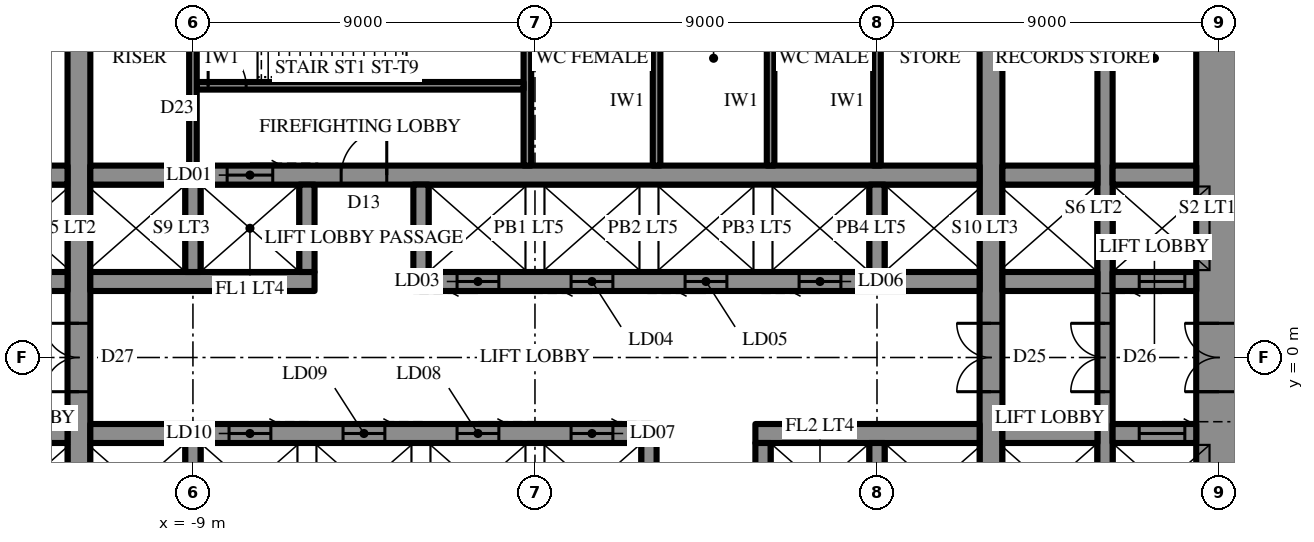
"""IFC4 building model, lengths in metres.
Left out: names, types, materials, properties, quantities, classifications, styles, units other than length and angle.
Written with IfcOpenShell. Run it as: python <this file> out.ifc"""

import sys

from ifc_helpers import new_model, si_unit, direction, frame, frame_2d, origin, place, context, subcontext, project, spatial, rectangle, extrude, element, fill, save


model = new_model("IFC4")
c1 = context("Model", 3, precision=1e-05, world=origin(), true_north=direction((0.0, 1.0)))
c2 = subcontext(c1, "Body", "Model", "MODEL_VIEW")
j1 = project(units=[si_unit("LENGTHUNIT", "METRE"), si_unit("PLANEANGLEUNIT", "RADIAN")], contexts=[c1])
p1 = place(None, origin())
s1 = spatial("IfcSite", under=j1, at=p1, CompositionType="ELEMENT")
p2 = place(p1, origin())
s2 = spatial("IfcBuilding", under=s1, at=p2, CompositionType="ELEMENT")
p3 = place(p2, frame((0.0, 0.0, 114.5)))
s3 = spatial("IfcBuildingStorey", under=s2, at=p3, CompositionType="ELEMENT", Elevation=114.5)
p4 = place(p3, frame((18.0, -10.7, 0.0), z_axis=(0.0, 0.0, 1.0), x_axis=(0.0, 1.0, 0.0)))
e1 = element("IfcWall", 1, at=p4, inside=s3, PredefinedType="SHEAR", context=c2, shape_type="SweptSolid", body=[
    extrude(rectangle(XDim=21.4, YDim=1.2, at=frame_2d((10.7, 0.0))), origin(), (0.0, 0.0, 1.0), 5.0),
])
p5 = place(p4, frame((9.8, 0.0, 0.0)))
e2 = element("IfcOpeningElement", 2, at=p5, cuts=e1, PredefinedType="OPENING", context=c2, shape_type="SweptSolid", body=[
    extrude(rectangle(XDim=1.8, YDim=2.4, at=frame_2d((0.9, 1.2))), frame((0.0, 0.61, 0.0), z_axis=(0.0, -1.0, 0.0), x_axis=(1.0, 0.0, 0.0)), (0.0, 0.0, 1.0), 1.22),
])
p6 = place(p3, frame((12.0, -10.7, 0.0), z_axis=(0.0, 0.0, 1.0), x_axis=(0.0, 1.0, 0.0)))
e3 = element("IfcWall", 3, at=p6, inside=s3, PredefinedType="SHEAR", context=c2, shape_type="SweptSolid", body=[
    extrude(rectangle(XDim=21.4, YDim=0.6, at=frame_2d((10.7, 0.0))), origin(), (0.0, 0.0, 1.0), 5.0),
])
p7 = place(p6, frame((9.8, 0.0, 0.0)))
e4 = element("IfcOpeningElement", 4, at=p7, cuts=e3, PredefinedType="OPENING", context=c2, shape_type="SweptSolid", body=[
    extrude(rectangle(XDim=1.8, YDim=2.4, at=frame_2d((0.9, 1.2))), frame((0.0, 0.31, 0.0), z_axis=(0.0, -1.0, 0.0), x_axis=(1.0, 0.0, 0.0)), (0.0, 0.0, 1.0), 0.62),
])
p8 = place(p3, frame((-12.0, -10.7, 0.0), z_axis=(0.0, 0.0, 1.0), x_axis=(0.0, 1.0, 0.0)))
e5 = element("IfcWall", 5, at=p8, inside=s3, PredefinedType="SHEAR", context=c2, shape_type="SweptSolid", body=[
    extrude(rectangle(XDim=21.4, YDim=0.6, at=frame_2d((10.7, 0.0))), origin(), (0.0, 0.0, 1.0), 5.0),
])
p9 = place(p8, frame((9.8, 0.0, 0.0)))
e6 = element("IfcOpeningElement", 6, at=p9, cuts=e5, PredefinedType="OPENING", context=c2, shape_type="SweptSolid", body=[
    extrude(rectangle(XDim=1.8, YDim=2.4, at=frame_2d((0.9, 1.2))), frame((0.0, 0.31, 0.0), z_axis=(0.0, -1.0, 0.0), x_axis=(1.0, 0.0, 0.0)), (0.0, 0.0, 1.0), 0.62),
])
p10 = place(p3, frame((15.0, -10.7, 0.0), z_axis=(0.0, 0.0, 1.0), x_axis=(0.0, 1.0, 0.0)))
e7 = element("IfcWall", 7, at=p10, inside=s3, PredefinedType="SHEAR", context=c2, shape_type="SweptSolid", body=[
    extrude(rectangle(XDim=21.4, YDim=0.4, at=frame_2d((10.7, 0.0))), origin(), (0.0, 0.0, 1.0), 5.0),
])
p11 = place(p10, frame((9.8, 0.0, 0.0)))
e8 = element("IfcOpeningElement", 8, at=p11, cuts=e7, PredefinedType="OPENING", context=c2, shape_type="SweptSolid", body=[
    extrude(rectangle(XDim=1.8, YDim=2.4, at=frame_2d((0.9, 1.2))), frame((0.0, 0.21, 0.0), z_axis=(0.0, -1.0, 0.0), x_axis=(1.0, 0.0, 0.0)), (0.0, 0.0, 1.0), 0.42),
])
p12 = place(p3, frame((-14.8, 2.0, 0.0), z_axis=(0.0, 0.0, 1.0), x_axis=(1.0, 0.0, 0.0)))
e9 = element("IfcWall", 9, at=p12, inside=s3, PredefinedType="SHEAR", context=c2, shape_type="SweptSolid", body=[
    extrude(rectangle(XDim=2.5, YDim=0.5, at=frame_2d((1.25, 0.0))), origin(), (0.0, 0.0, 1.0), 5.0),
])
p13 = place(p3, frame((-11.7, 2.0, 0.0), z_axis=(0.0, 0.0, 1.0), x_axis=(1.0, 0.0, 0.0)))
e10 = element("IfcWall", 10, at=p13, inside=s3, PredefinedType="SHEAR", context=c2, shape_type="SweptSolid", body=[
    extrude(rectangle(XDim=5.9, YDim=0.5, at=frame_2d((2.95, 0.0))), origin(), (0.0, 0.0, 1.0), 5.0),
])
p14 = place(p3, frame((-3.2, 2.0, 0.0), z_axis=(0.0, 0.0, 1.0), x_axis=(1.0, 0.0, 0.0)))
e11 = element("IfcWall", 11, at=p14, inside=s3, PredefinedType="SHEAR", context=c2, shape_type="SweptSolid", body=[
    extrude(rectangle(XDim=14.9, YDim=0.5, at=frame_2d((7.45, 0.0))), origin(), (0.0, 0.0, 1.0), 5.0),
])
p15 = place(p14, frame((1.15, 0.0, 0.0)))
e12 = element("IfcOpeningElement", 12, at=p15, cuts=e11, PredefinedType="OPENING", context=c2, shape_type="SweptSolid", body=[
    extrude(rectangle(XDim=1.1, YDim=2.2, at=frame_2d((0.55, 1.1))), frame((0.0, 0.26, 0.0), z_axis=(0.0, -1.0, 0.0), x_axis=(1.0, 0.0, 0.0)), (0.0, 0.0, 1.0), 0.52),
])
p16 = place(p14, frame((4.15, 0.0, 0.0)))
e13 = element("IfcOpeningElement", 13, at=p16, cuts=e11, PredefinedType="OPENING", context=c2, shape_type="SweptSolid", body=[
    extrude(rectangle(XDim=1.1, YDim=2.2, at=frame_2d((0.55, 1.1))), frame((0.0, 0.26, 0.0), z_axis=(0.0, -1.0, 0.0), x_axis=(1.0, 0.0, 0.0)), (0.0, 0.0, 1.0), 0.52),
])
p17 = place(p14, frame((7.15, 0.0, 0.0)))
e14 = element("IfcOpeningElement", 14, at=p17, cuts=e11, PredefinedType="OPENING", context=c2, shape_type="SweptSolid", body=[
    extrude(rectangle(XDim=1.1, YDim=2.2, at=frame_2d((0.55, 1.1))), frame((0.0, 0.26, 0.0), z_axis=(0.0, -1.0, 0.0), x_axis=(1.0, 0.0, 0.0)), (0.0, 0.0, 1.0), 0.52),
])
p18 = place(p14, frame((10.15, 0.0, 0.0)))
e15 = element("IfcOpeningElement", 15, at=p18, cuts=e11, PredefinedType="OPENING", context=c2, shape_type="SweptSolid", body=[
    extrude(rectangle(XDim=1.1, YDim=2.2, at=frame_2d((0.55, 1.1))), frame((0.0, 0.26, 0.0), z_axis=(0.0, -1.0, 0.0), x_axis=(1.0, 0.0, 0.0)), (0.0, 0.0, 1.0), 0.52),
])
p19 = place(p3, frame((12.3, 2.0, 0.0), z_axis=(0.0, 0.0, 1.0), x_axis=(1.0, 0.0, 0.0)))
e16 = element("IfcWall", 16, at=p19, inside=s3, PredefinedType="SHEAR", context=c2, shape_type="SweptSolid", body=[
    extrude(rectangle(XDim=2.5, YDim=0.5, at=frame_2d((1.25, 0.0))), origin(), (0.0, 0.0, 1.0), 5.0),
])
p20 = place(p3, frame((15.2, 2.0, 0.0), z_axis=(0.0, 0.0, 1.0), x_axis=(1.0, 0.0, 0.0)))
e17 = element("IfcWall", 17, at=p20, inside=s3, PredefinedType="SHEAR", context=c2, shape_type="SweptSolid", body=[
    extrude(rectangle(XDim=2.2, YDim=0.5, at=frame_2d((1.1, 0.0))), origin(), (0.0, 0.0, 1.0), 5.0),
])
p21 = place(p20, frame((0.7, 0.0, 0.0)))
e18 = element("IfcOpeningElement", 18, at=p21, cuts=e17, PredefinedType="OPENING", context=c2, shape_type="SweptSolid", body=[
    extrude(rectangle(XDim=1.2, YDim=2.2, at=frame_2d((0.6, 1.1))), frame((0.0, 0.26, 0.0), z_axis=(0.0, -1.0, 0.0), x_axis=(1.0, 0.0, 0.0)), (0.0, 0.0, 1.0), 0.52),
])
p22 = place(p3, frame((-14.8, 4.8, 0.0), z_axis=(0.0, 0.0, 1.0), x_axis=(1.0, 0.0, 0.0)))
e19 = element("IfcWall", 19, at=p22, inside=s3, PredefinedType="SHEAR", context=c2, shape_type="SweptSolid", body=[
    extrude(rectangle(XDim=2.5, YDim=0.5, at=frame_2d((1.25, 0.0))), origin(), (0.0, 0.0, 1.0), 5.0),
])
p23 = place(p3, frame((-11.7, 4.8, 0.0), z_axis=(0.0, 0.0, 1.0), x_axis=(1.0, 0.0, 0.0)))
e20 = element("IfcWall", 20, at=p23, inside=s3, PredefinedType="SHEAR", context=c2, shape_type="SweptSolid", body=[
    extrude(rectangle(XDim=23.4, YDim=0.5, at=frame_2d((11.7, 0.0))), origin(), (0.0, 0.0, 1.0), 5.0),
])
p24 = place(p23, frame((6.6, 0.0, 0.0)))
e21 = element("IfcOpeningElement", 21, at=p24, cuts=e20, PredefinedType="OPENING", context=c2, shape_type="SweptSolid", body=[
    extrude(rectangle(XDim=1.2, YDim=2.2, at=frame_2d((0.6, 1.1))), frame((0.0, 0.26, 0.0), z_axis=(0.0, -1.0, 0.0), x_axis=(1.0, 0.0, 0.0)), (0.0, 0.0, 1.0), 0.52),
])
p25 = place(p23, frame((3.6, 0.0, 0.0)))
e22 = element("IfcOpeningElement", 22, at=p25, cuts=e20, PredefinedType="OPENING", context=c2, shape_type="SweptSolid", body=[
    extrude(rectangle(XDim=1.2, YDim=2.2, at=frame_2d((0.6, 1.1))), frame((0.0, 0.26, 0.0), z_axis=(0.0, -1.0, 0.0), x_axis=(1.0, 0.0, 0.0)), (0.0, 0.0, 1.0), 0.52),
])
p26 = place(p3, frame((12.3, 4.8, 0.0), z_axis=(0.0, 0.0, 1.0), x_axis=(1.0, 0.0, 0.0)))
e23 = element("IfcWall", 23, at=p26, inside=s3, PredefinedType="SHEAR", context=c2, shape_type="SweptSolid", body=[
    extrude(rectangle(XDim=2.5, YDim=0.5, at=frame_2d((1.25, 0.0))), origin(), (0.0, 0.0, 1.0), 5.0),
])
p27 = place(p3, frame((15.2, 4.8, 0.0), z_axis=(0.0, 0.0, 1.0), x_axis=(1.0, 0.0, 0.0)))
e24 = element("IfcWall", 24, at=p27, inside=s3, PredefinedType="SHEAR", context=c2, shape_type="SweptSolid", body=[
    extrude(rectangle(XDim=2.2, YDim=0.5, at=frame_2d((1.1, 0.0))), origin(), (0.0, 0.0, 1.0), 5.0),
])
for number, where, z_axis, x_axis in (
    (25, (-9.0, 2.25, 0.0), (0.0, 0.0, 1.0), (0.0, 1.0, 0.0)),
    (26, (-6.0, 2.25, 0.0), (0.0, 0.0, 1.0), (0.0, 1.0, 0.0)),
    (27, (-3.0, 2.25, 0.0), (0.0, 0.0, 1.0), (0.0, 1.0, 0.0)),
    (28, (9.0, 2.25, 0.0), (0.0, 0.0, 1.0), (0.0, 1.0, 0.0)),
):
    element("IfcWall", number, at=place(p3, frame(where, z_axis=z_axis, x_axis=x_axis)), inside=s3, PredefinedType="SHEAR", context=c2, shape_type="SweptSolid", body=[
        extrude(rectangle(XDim=2.3, YDim=0.4, at=frame_2d((1.15, 0.0))), origin(), (0.0, 0.0, 1.0), 5.0),
    ])
p28 = place(p3, frame((-0.2, 5.05, 0.0), z_axis=(0.0, 0.0, 1.0), x_axis=(0.0, 1.0, 0.0)))
e29 = element("IfcWall", 29, at=p28, inside=s3, PredefinedType="SHEAR", context=c2, shape_type="SweptSolid", body=[
    extrude(rectangle(XDim=5.65, YDim=0.2, at=frame_2d((2.825, 0.0))), origin(), (0.0, 0.0, 1.0), 5.0),
])
p29 = place(p3, frame((-8.9, 7.15, 0.0), z_axis=(0.0, 0.0, 1.0), x_axis=(1.0, 0.0, 0.0)))
e30 = element("IfcWall", 30, at=p29, inside=s3, PredefinedType="SHEAR", context=c2, shape_type="SweptSolid", body=[
    extrude(rectangle(XDim=8.6, YDim=0.2, at=frame_2d((4.3, 0.0))), origin(), (0.0, 0.0, 1.0), 5.0),
])
p30 = place(p29, frame((0.3, 0.0, 0.0)))
e31 = element("IfcOpeningElement", 31, at=p30, cuts=e30, PredefinedType="OPENING", context=c2, shape_type="SweptSolid", body=[
    extrude(rectangle(XDim=1.0, YDim=2.2, at=frame_2d((0.5, 1.1))), frame((0.0, 0.11, 0.0), z_axis=(0.0, -1.0, 0.0), x_axis=(1.0, 0.0, 0.0)), (0.0, 0.0, 1.0), 0.22),
])
p31 = place(p3, frame((17.4, -2.0, 0.0), z_axis=(0.0, 0.0, 1.0), x_axis=(-1.0, 0.0, 0.0)))
e32 = element("IfcWall", 32, at=p31, inside=s3, PredefinedType="SHEAR", context=c2, shape_type="SweptSolid", body=[
    extrude(rectangle(XDim=2.2, YDim=0.5, at=frame_2d((1.1, 0.0))), origin(), (0.0, 0.0, 1.0), 5.0),
])
p32 = place(p31, frame((0.3, 0.0, 0.0)))
e33 = element("IfcOpeningElement", 33, at=p32, cuts=e32, PredefinedType="OPENING", context=c2, shape_type="SweptSolid", body=[
    extrude(rectangle(XDim=1.2, YDim=2.2, at=frame_2d((0.6, 1.1))), frame((0.0, 0.26, 0.0), z_axis=(0.0, -1.0, 0.0), x_axis=(1.0, 0.0, 0.0)), (0.0, 0.0, 1.0), 0.52),
])
p33 = place(p3, frame((14.8, -2.0, 0.0), z_axis=(0.0, 0.0, 1.0), x_axis=(-1.0, 0.0, 0.0)))
e34 = element("IfcWall", 34, at=p33, inside=s3, PredefinedType="SHEAR", context=c2, shape_type="SweptSolid", body=[
    extrude(rectangle(XDim=2.5, YDim=0.5, at=frame_2d((1.25, 0.0))), origin(), (0.0, 0.0, 1.0), 5.0),
])
p34 = place(p3, frame((11.7, -2.0, 0.0), z_axis=(0.0, 0.0, 1.0), x_axis=(-1.0, 0.0, 0.0)))
e35 = element("IfcWall", 35, at=p34, inside=s3, PredefinedType="SHEAR", context=c2, shape_type="SweptSolid", body=[
    extrude(rectangle(XDim=5.9, YDim=0.5, at=frame_2d((2.95, 0.0))), origin(), (0.0, 0.0, 1.0), 5.0),
])
p35 = place(p3, frame((3.2, -2.0, 0.0), z_axis=(0.0, 0.0, 1.0), x_axis=(-1.0, 0.0, 0.0)))
e36 = element("IfcWall", 36, at=p35, inside=s3, PredefinedType="SHEAR", context=c2, shape_type="SweptSolid", body=[
    extrude(rectangle(XDim=14.9, YDim=0.5, at=frame_2d((7.45, 0.0))), origin(), (0.0, 0.0, 1.0), 5.0),
])
p36 = place(p35, frame((1.15, 0.0, 0.0)))
e37 = element("IfcOpeningElement", 37, at=p36, cuts=e36, PredefinedType="OPENING", context=c2, shape_type="SweptSolid", body=[
    extrude(rectangle(XDim=1.1, YDim=2.2, at=frame_2d((0.55, 1.1))), frame((0.0, 0.26, 0.0), z_axis=(0.0, -1.0, 0.0), x_axis=(1.0, 0.0, 0.0)), (0.0, 0.0, 1.0), 0.52),
])
p37 = place(p35, frame((4.15, 0.0, 0.0)))
e38 = element("IfcOpeningElement", 38, at=p37, cuts=e36, PredefinedType="OPENING", context=c2, shape_type="SweptSolid", body=[
    extrude(rectangle(XDim=1.1, YDim=2.2, at=frame_2d((0.55, 1.1))), frame((0.0, 0.26, 0.0), z_axis=(0.0, -1.0, 0.0), x_axis=(1.0, 0.0, 0.0)), (0.0, 0.0, 1.0), 0.52),
])
p38 = place(p35, frame((7.15, 0.0, 0.0)))
e39 = element("IfcOpeningElement", 39, at=p38, cuts=e36, PredefinedType="OPENING", context=c2, shape_type="SweptSolid", body=[
    extrude(rectangle(XDim=1.1, YDim=2.2, at=frame_2d((0.55, 1.1))), frame((0.0, 0.26, 0.0), z_axis=(0.0, -1.0, 0.0), x_axis=(1.0, 0.0, 0.0)), (0.0, 0.0, 1.0), 0.52),
])
p39 = place(p35, frame((10.15, 0.0, 0.0)))
e40 = element("IfcOpeningElement", 40, at=p39, cuts=e36, PredefinedType="OPENING", context=c2, shape_type="SweptSolid", body=[
    extrude(rectangle(XDim=1.1, YDim=2.2, at=frame_2d((0.55, 1.1))), frame((0.0, 0.26, 0.0), z_axis=(0.0, -1.0, 0.0), x_axis=(1.0, 0.0, 0.0)), (0.0, 0.0, 1.0), 0.52),
])
p40 = place(p3, frame((-12.3, -2.0, 0.0), z_axis=(0.0, 0.0, 1.0), x_axis=(-1.0, 0.0, 0.0)))
e41 = element("IfcWall", 41, at=p40, inside=s3, PredefinedType="SHEAR", context=c2, shape_type="SweptSolid", body=[
    extrude(rectangle(XDim=2.5, YDim=0.5, at=frame_2d((1.25, 0.0))), origin(), (0.0, 0.0, 1.0), 5.0),
])
for number, where, z_axis, x_axis in (
    (42, (9.0, -2.25, 0.0), (0.0, 0.0, 1.0), (0.0, -1.0, 0.0)),
    (43, (6.0, -2.25, 0.0), (0.0, 0.0, 1.0), (0.0, -1.0, 0.0)),
    (44, (3.0, -2.25, 0.0), (0.0, 0.0, 1.0), (0.0, -1.0, 0.0)),
    (45, (-9.0, -2.25, 0.0), (0.0, 0.0, 1.0), (0.0, -1.0, 0.0)),
):
    element("IfcWall", number, at=place(p3, frame(where, z_axis=z_axis, x_axis=x_axis)), inside=s3, PredefinedType="SHEAR", context=c2, shape_type="SweptSolid", body=[
        extrude(rectangle(XDim=2.3, YDim=0.4, at=frame_2d((1.15, 0.0))), origin(), (0.0, 0.0, 1.0), 5.0),
    ])
for number, where, z_axis, x_axis in (
    (46, (-9.0, 5.05, 0.0), (0.0, 0.0, 1.0), (0.0, 1.0, 0.0)),
    (47, (9.0, 5.05, 0.0), (0.0, 0.0, 1.0), (0.0, 1.0, 0.0)),
    (48, (3.2, 5.05, 0.0), (0.0, 0.0, 1.0), (0.0, 1.0, 0.0)),
    (49, (6.2, 5.05, 0.0), (0.0, 0.0, 1.0), (0.0, 1.0, 0.0)),
):
    element("IfcWall", number, at=place(p3, frame(where, z_axis=z_axis, x_axis=x_axis)), inside=s3, PredefinedType="PARTITIONING", context=c2, shape_type="SweptSolid", body=[
        extrude(rectangle(XDim=5.65, YDim=0.2, at=frame_2d((2.825, 0.0))), origin(), (0.0, 0.0, 1.0), 4.8),
    ])
p41 = place(p5, origin())
e50 = element("IfcDoor", 50, at=p41, inside=s3, OperationType="DOUBLE_DOOR_SINGLE_SWING", PredefinedType="DOOR", context=c2, shape_type="SweptSolid", body=[
    extrude(rectangle(XDim=1.8, YDim=2.4, at=frame_2d((0.9, 1.2))), frame((0.0, 0.025, 0.0), z_axis=(0.0, -1.0, 0.0), x_axis=(1.0, 0.0, 0.0)), (0.0, 0.0, 1.0), 0.05),
])
fill(e2, e50)
p42 = place(p24, origin())
e51 = element("IfcDoor", 51, at=p42, inside=s3, OperationType="SINGLE_SWING_LEFT", PredefinedType="DOOR", context=c2, shape_type="SweptSolid", body=[
    extrude(rectangle(XDim=1.2, YDim=2.2, at=frame_2d((0.6, 1.1))), frame((0.0, 0.025, 0.0), z_axis=(0.0, -1.0, 0.0), x_axis=(1.0, 0.0, 0.0)), (0.0, 0.0, 1.0), 0.05),
])
fill(e21, e51)
p43 = place(p30, origin())
e52 = element("IfcDoor", 52, at=p43, inside=s3, OperationType="SINGLE_SWING_RIGHT", PredefinedType="DOOR", context=c2, shape_type="SweptSolid", body=[
    extrude(rectangle(XDim=1.0, YDim=2.2, at=frame_2d((0.5, 1.1))), frame((0.0, 0.025, 0.0), z_axis=(0.0, -1.0, 0.0), x_axis=(1.0, 0.0, 0.0)), (0.0, 0.0, 1.0), 0.05),
])
fill(e31, e52)
p44 = place(p7, origin())
e53 = element("IfcDoor", 53, at=p44, inside=s3, OperationType="DOUBLE_DOOR_SINGLE_SWING", PredefinedType="DOOR", context=c2, shape_type="SweptSolid", body=[
    extrude(rectangle(XDim=1.8, YDim=2.4, at=frame_2d((0.9, 1.2))), frame((0.0, 0.025, 0.0), z_axis=(0.0, -1.0, 0.0), x_axis=(1.0, 0.0, 0.0)), (0.0, 0.0, 1.0), 0.05),
])
fill(e4, e53)
p45 = place(p9, origin())
e54 = element("IfcDoor", 54, at=p45, inside=s3, OperationType="DOUBLE_DOOR_SINGLE_SWING", PredefinedType="DOOR", context=c2, shape_type="SweptSolid", body=[
    extrude(rectangle(XDim=1.8, YDim=2.4, at=frame_2d((0.9, 1.2))), frame((0.0, 0.025, 0.0), z_axis=(0.0, -1.0, 0.0), x_axis=(1.0, 0.0, 0.0)), (0.0, 0.0, 1.0), 0.05),
])
fill(e6, e54)
p46 = place(p11, origin())
e55 = element("IfcDoor", 55, at=p46, inside=s3, OperationType="DOUBLE_DOOR_SINGLE_SWING", PredefinedType="DOOR", context=c2, shape_type="SweptSolid", body=[
    extrude(rectangle(XDim=1.8, YDim=2.4, at=frame_2d((0.9, 1.2))), frame((0.0, 0.025, 0.0), z_axis=(0.0, -1.0, 0.0), x_axis=(1.0, 0.0, 0.0)), (0.0, 0.0, 1.0), 0.05),
])
fill(e8, e55)
p47 = place(p25, origin())
e56 = element("IfcDoor", 56, at=p47, inside=s3, OperationType="SLIDING_TO_LEFT", PredefinedType="DOOR", context=c2, shape_type="SweptSolid", body=[
    extrude(rectangle(XDim=1.2, YDim=2.2, at=frame_2d((0.6, 1.1))), frame((0.0, 0.025, 0.0), z_axis=(0.0, -1.0, 0.0), x_axis=(1.0, 0.0, 0.0)), (0.0, 0.0, 1.0), 0.05),
])
fill(e22, e56)
p48 = place(p15, frame((1.1, 0.0, 0.0), z_axis=(0.0, 0.0, 1.0), x_axis=(-1.0, 0.0, 0.0)))
e57 = element("IfcDoor", 57, at=p48, inside=s3, OperationType="SLIDING_TO_LEFT", PredefinedType="DOOR", context=c2, shape_type="SweptSolid", body=[
    extrude(rectangle(XDim=1.1, YDim=2.2, at=frame_2d((0.55, 1.1))), frame((0.0, 0.025, 0.0), z_axis=(0.0, -1.0, 0.0), x_axis=(1.0, 0.0, 0.0)), (0.0, 0.0, 1.0), 0.05),
])
fill(e12, e57)
p49 = place(p16, frame((1.1, 0.0, 0.0), z_axis=(0.0, 0.0, 1.0), x_axis=(-1.0, 0.0, 0.0)))
e58 = element("IfcDoor", 58, at=p49, inside=s3, OperationType="SLIDING_TO_LEFT", PredefinedType="DOOR", context=c2, shape_type="SweptSolid", body=[
    extrude(rectangle(XDim=1.1, YDim=2.2, at=frame_2d((0.55, 1.1))), frame((0.0, 0.025, 0.0), z_axis=(0.0, -1.0, 0.0), x_axis=(1.0, 0.0, 0.0)), (0.0, 0.0, 1.0), 0.05),
])
fill(e13, e58)
p50 = place(p17, frame((1.1, 0.0, 0.0), z_axis=(0.0, 0.0, 1.0), x_axis=(-1.0, 0.0, 0.0)))
e59 = element("IfcDoor", 59, at=p50, inside=s3, OperationType="SLIDING_TO_LEFT", PredefinedType="DOOR", context=c2, shape_type="SweptSolid", body=[
    extrude(rectangle(XDim=1.1, YDim=2.2, at=frame_2d((0.55, 1.1))), frame((0.0, 0.025, 0.0), z_axis=(0.0, -1.0, 0.0), x_axis=(1.0, 0.0, 0.0)), (0.0, 0.0, 1.0), 0.05),
])
fill(e14, e59)
p51 = place(p18, frame((1.1, 0.0, 0.0), z_axis=(0.0, 0.0, 1.0), x_axis=(-1.0, 0.0, 0.0)))
e60 = element("IfcDoor", 60, at=p51, inside=s3, OperationType="SLIDING_TO_LEFT", PredefinedType="DOOR", context=c2, shape_type="SweptSolid", body=[
    extrude(rectangle(XDim=1.1, YDim=2.2, at=frame_2d((0.55, 1.1))), frame((0.0, 0.025, 0.0), z_axis=(0.0, -1.0, 0.0), x_axis=(1.0, 0.0, 0.0)), (0.0, 0.0, 1.0), 0.05),
])
fill(e15, e60)
p52 = place(p21, frame((1.2, 0.0, 0.0), z_axis=(0.0, 0.0, 1.0), x_axis=(-1.0, 0.0, 0.0)))
e61 = element("IfcDoor", 61, at=p52, inside=s3, OperationType="SLIDING_TO_LEFT", PredefinedType="DOOR", context=c2, shape_type="SweptSolid", body=[
    extrude(rectangle(XDim=1.2, YDim=2.2, at=frame_2d((0.6, 1.1))), frame((0.0, 0.025, 0.0), z_axis=(0.0, -1.0, 0.0), x_axis=(1.0, 0.0, 0.0)), (0.0, 0.0, 1.0), 0.05),
])
fill(e18, e61)
p53 = place(p32, frame((1.2, 0.0, 0.0), z_axis=(0.0, 0.0, 1.0), x_axis=(-1.0, 0.0, 0.0)))
e62 = element("IfcDoor", 62, at=p53, inside=s3, OperationType="SLIDING_TO_LEFT", PredefinedType="DOOR", context=c2, shape_type="SweptSolid", body=[
    extrude(rectangle(XDim=1.2, YDim=2.2, at=frame_2d((0.6, 1.1))), frame((0.0, 0.025, 0.0), z_axis=(0.0, -1.0, 0.0), x_axis=(1.0, 0.0, 0.0)), (0.0, 0.0, 1.0), 0.05),
])
fill(e33, e62)
p54 = place(p36, frame((1.1, 0.0, 0.0), z_axis=(0.0, 0.0, 1.0), x_axis=(-1.0, 0.0, 0.0)))
e63 = element("IfcDoor", 63, at=p54, inside=s3, OperationType="SLIDING_TO_LEFT", PredefinedType="DOOR", context=c2, shape_type="SweptSolid", body=[
    extrude(rectangle(XDim=1.1, YDim=2.2, at=frame_2d((0.55, 1.1))), frame((0.0, 0.025, 0.0), z_axis=(0.0, -1.0, 0.0), x_axis=(1.0, 0.0, 0.0)), (0.0, 0.0, 1.0), 0.05),
])
fill(e37, e63)
p55 = place(p37, frame((1.1, 0.0, 0.0), z_axis=(0.0, 0.0, 1.0), x_axis=(-1.0, 0.0, 0.0)))
e64 = element("IfcDoor", 64, at=p55, inside=s3, OperationType="SLIDING_TO_LEFT", PredefinedType="DOOR", context=c2, shape_type="SweptSolid", body=[
    extrude(rectangle(XDim=1.1, YDim=2.2, at=frame_2d((0.55, 1.1))), frame((0.0, 0.025, 0.0), z_axis=(0.0, -1.0, 0.0), x_axis=(1.0, 0.0, 0.0)), (0.0, 0.0, 1.0), 0.05),
])
fill(e38, e64)
p56 = place(p38, frame((1.1, 0.0, 0.0), z_axis=(0.0, 0.0, 1.0), x_axis=(-1.0, 0.0, 0.0)))
e65 = element("IfcDoor", 65, at=p56, inside=s3, OperationType="SLIDING_TO_LEFT", PredefinedType="DOOR", context=c2, shape_type="SweptSolid", body=[
    extrude(rectangle(XDim=1.1, YDim=2.2, at=frame_2d((0.55, 1.1))), frame((0.0, 0.025, 0.0), z_axis=(0.0, -1.0, 0.0), x_axis=(1.0, 0.0, 0.0)), (0.0, 0.0, 1.0), 0.05),
])
fill(e39, e65)
p57 = place(p39, frame((1.1, 0.0, 0.0), z_axis=(0.0, 0.0, 1.0), x_axis=(-1.0, 0.0, 0.0)))
e66 = element("IfcDoor", 66, at=p57, inside=s3, OperationType="SLIDING_TO_LEFT", PredefinedType="DOOR", context=c2, shape_type="SweptSolid", body=[
    extrude(rectangle(XDim=1.1, YDim=2.2, at=frame_2d((0.55, 1.1))), frame((0.0, 0.025, 0.0), z_axis=(0.0, -1.0, 0.0), x_axis=(1.0, 0.0, 0.0)), (0.0, 0.0, 1.0), 0.05),
])
fill(e40, e66)
save(model, sys.argv[1])
